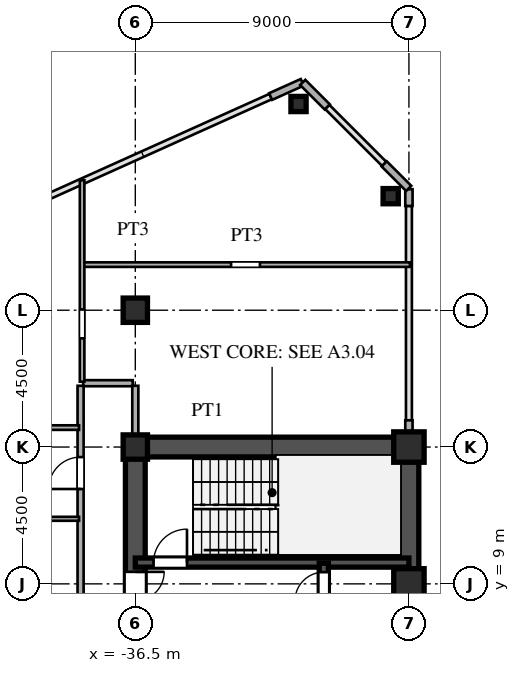
"""IFC4 building model, lengths in metres.
Left out: names, types, materials, properties, quantities, classifications, styles, units other than length and angle.
Written with IfcOpenShell. Run it as: python <this file> out.ifc"""

import sys

from ifc_helpers import new_model, si_unit, direction, frame, frame_2d, origin, origin_2d, place, context, subcontext, project, spatial, rectangle, hollow_rectangle, i_section, extrude, source, transform, mapped, element, fill, save


model = new_model("IFC4")
c1 = context("Model", 3, precision=1e-05, world=origin(), true_north=direction((0.0, 1.0)))
c2 = subcontext(c1, "Body", "Model", "MODEL_VIEW")
j1 = project(units=[si_unit("LENGTHUNIT", "METRE"), si_unit("PLANEANGLEUNIT", "RADIAN")], contexts=[c1])
p1 = place(None, origin())
s1 = spatial("IfcSite", under=j1, at=p1, CompositionType="ELEMENT")
p2 = place(p1, origin())
s2 = spatial("IfcBuilding", under=s1, at=p2, CompositionType="ELEMENT")
p3 = place(p2, frame((0.0, 0.0, 92.4)))
s3 = spatial("IfcBuildingStorey", under=s2, at=p3, CompositionType="ELEMENT", Elevation=92.4)
m1 = source(origin(), c2, "Body", "SweptSolid", [
    extrude(hollow_rectangle(XDim=1.0, YDim=1.0, WallThickness=0.042, at=origin_2d()), origin(), (0.0, 0.0, 1.0), 3.6),
])
for number, where, z_axis, x_axis in (
    (1, (-27.5, 9.0, 0.0), (0.0, 0.0, 1.0), (1.0, 0.0, 0.0)),
    (2, (-27.5, 13.5, 0.0), (0.0, 0.0, 1.0), (1.0, 0.0, 0.0)),
):
    element("IfcColumn", number, at=place(p3, frame(where, z_axis=z_axis, x_axis=x_axis)), inside=s3, PredefinedType="COLUMN", context=c2, shape_type="MappedRepresentation", body=[
        mapped(m1, transform((0.0, 0.0, 0.0), scale=1.0)),
    ])
m2 = source(origin(), c2, "Body", "SweptSolid", [
    extrude(i_section(OverallWidth=0.8, OverallDepth=0.8, WebThickness=0.032, FlangeThickness=0.05, at=origin_2d()), origin(), (0.0, 0.0, 1.0), 3.6),
])
for number, where, z_axis, x_axis in (
    (3, (-36.5, 13.5, 0.0), (0.0, 0.0, 1.0), (1.0, 0.0, 0.0)),
    (4, (-36.5, 18.0, 0.0), (0.0, 0.0, 1.0), (1.0, 0.0, 0.0)),
):
    element("IfcColumn", number, at=place(p3, frame(where, z_axis=z_axis, x_axis=x_axis)), inside=s3, PredefinedType="COLUMN", context=c2, shape_type="MappedRepresentation", body=[
        mapped(m2, transform((0.0, 0.0, 0.0), scale=1.0)),
    ])
m3 = source(origin(), c2, "Body", "SweptSolid", [
    extrude(hollow_rectangle(XDim=0.5, YDim=0.5, WallThickness=0.02, at=origin_2d()), origin(), (0.0, 0.0, 1.0), 3.6),
])
for number, where, z_axis, x_axis in (
    (5, (-28.1, 21.751, 0.0), (0.0, 0.0, 1.0), (1.0, 0.0, 0.0)),
    (6, (-31.131, 24.783, 0.0), (0.0, 0.0, 1.0), (1.0, 0.0, 0.0)),
):
    element("IfcColumn", number, at=place(p3, frame(where, z_axis=z_axis, x_axis=x_axis)), inside=s3, PredefinedType="COLUMN", context=c2, shape_type="MappedRepresentation", body=[
        mapped(m3, transform((0.0, 0.0, 0.0), scale=1.0)),
    ])
p4 = place(p3, frame((-27.5, 13.83, 0.0), z_axis=(0.0, 0.0, 1.0), x_axis=(0.0, 1.0, 0.0)))
e7 = element("IfcWall", 7, at=p4, inside=s3, PredefinedType="SOLIDWALL", context=c2, shape_type="SweptSolid", body=[
    extrude(rectangle(XDim=0.55, YDim=0.24, at=frame_2d((0.275, 0.0))), origin(), (0.0, 0.0, 1.0), 2.88),
])
p5 = place(p3, frame((-27.5, 21.43, 0.0), z_axis=(0.0, 0.0, 1.0), x_axis=(0.0, 1.0, 0.0)))
e8 = element("IfcWall", 8, at=p5, inside=s3, PredefinedType="SOLIDWALL", context=c2, shape_type="SweptSolid", body=[
    extrude(rectangle(XDim=0.55, YDim=0.24, at=frame_2d((0.275, 0.0))), origin(), (0.0, 0.0, 1.0), 3.38),
])
for number, where, z_axis, x_axis in (
    (9, (-27.507, 22.007, 0.0), (0.0, 0.0, 1.0), (-0.707, 0.707, 0.0)),
    (10, (-30.187, 24.687, 0.0), (0.0, 0.0, 1.0), (-0.707, 0.707, 0.0)),
):
    element("IfcWall", number, at=place(p3, frame(where, z_axis=z_axis, x_axis=x_axis)), inside=s3, PredefinedType="SOLIDWALL", context=c2, shape_type="SweptSolid", body=[
        extrude(rectangle(XDim=1.14, YDim=0.24, at=frame_2d((0.57, 0.0))), origin(), (0.0, 0.0, 1.0), 3.38),
    ])
p6 = place(p3, frame((-31.009, 25.496, 0.0), z_axis=(0.0, 0.0, 1.0), x_axis=(-0.911929519623, -0.410346866979, 0.0)))
e11 = element("IfcWall", 11, at=p6, inside=s3, PredefinedType="SOLIDWALL", context=c2, shape_type="SweptSolid", body=[
    extrude(rectangle(XDim=1.14, YDim=0.24, at=frame_2d((0.57, 0.0))), origin(), (0.0, 0.0, 1.0), 3.38),
])
p7 = place(p3, frame((-27.5, 1.3, 0.0), z_axis=(0.0, 0.0, 1.0), x_axis=(0.0, 1.0, 0.0)))
e12 = element("IfcWall", 12, at=p7, inside=s3, PredefinedType="SHEAR", context=c2, shape_type="SweptSolid", body=[
    extrude(rectangle(XDim=12.2, YDim=0.65, at=frame_2d((6.1, 0.0))), origin(), (0.0, 0.0, 1.0), 3.38),
])
p8 = place(p3, frame((-36.5, 13.5, 0.0), z_axis=(0.0, 0.0, 1.0), x_axis=(1.0, 0.0, 0.0)))
e13 = element("IfcWall", 13, at=p8, inside=s3, PredefinedType="SHEAR", context=c2, shape_type="SweptSolid", body=[
    extrude(rectangle(XDim=9.0, YDim=0.65, at=frame_2d((4.5, 0.0))), origin(), (0.0, 0.0, 1.0), 3.38),
])
p9 = place(p3, frame((-36.5, 8.2, 0.0), z_axis=(0.0, 0.0, 1.0), x_axis=(0.0, 1.0, 0.0)))
e14 = element("IfcWall", 14, at=p9, inside=s3, PredefinedType="SHEAR", context=c2, shape_type="SweptSolid", body=[
    extrude(rectangle(XDim=5.45, YDim=0.65, at=frame_2d((2.725, 0.0))), origin(), (0.0, 0.0, 1.0), 3.38),
])
p10 = place(p9, frame((0.245, 0.0, 0.0)))
e15 = element("IfcOpeningElement", 15, at=p10, cuts=e14, PredefinedType="OPENING", context=c2, shape_type="SweptSolid", body=[
    extrude(rectangle(XDim=0.95, YDim=2.15, at=frame_2d((0.475, 1.075))), frame((0.0, 0.335, 0.0), z_axis=(0.0, -1.0, 0.0), x_axis=(1.0, 0.0, 0.0)), (0.0, 0.0, 1.0), 0.67),
])
p11 = place(p3, frame((-36.5, 9.7, 0.0), z_axis=(0.0, 0.0, 1.0), x_axis=(1.0, 0.0, 0.0)))
e16 = element("IfcWall", 16, at=p11, inside=s3, PredefinedType="SHEAR", context=c2, shape_type="SweptSolid", body=[
    extrude(rectangle(XDim=9.0, YDim=0.3, at=frame_2d((4.5, 0.0))), origin(), (0.0, 0.0, 1.0), 3.38),
])
p12 = place(p11, frame((0.6, 0.0, 0.0)))
e17 = element("IfcOpeningElement", 17, at=p12, cuts=e16, PredefinedType="OPENING", context=c2, shape_type="SweptSolid", body=[
    extrude(rectangle(XDim=1.1, YDim=2.2, at=frame_2d((0.55, 1.1))), frame((0.0, 0.16, 0.0), z_axis=(0.0, -1.0, 0.0), x_axis=(1.0, 0.0, 0.0)), (0.0, 0.0, 1.0), 0.32),
])
p13 = place(p3, frame((-30.3, 8.15, 0.0), z_axis=(0.0, 0.0, 1.0), x_axis=(0.0, 1.0, 0.0)))
e18 = element("IfcWall", 18, at=p13, inside=s3, PredefinedType="SHEAR", context=c2, shape_type="SweptSolid", body=[
    extrude(rectangle(XDim=1.53, YDim=0.3, at=frame_2d((0.765, 0.0))), origin(), (0.0, 0.0, 1.0), 3.38),
])
p14 = place(p13, frame((0.285, 0.0, 0.0)))
e19 = element("IfcOpeningElement", 19, at=p14, cuts=e18, PredefinedType="OPENING", context=c2, shape_type="SweptSolid", body=[
    extrude(rectangle(XDim=0.95, YDim=2.15, at=frame_2d((0.475, 1.075))), frame((0.0, 0.16, 0.0), z_axis=(0.0, -1.0, 0.0), x_axis=(1.0, 0.0, 0.0)), (0.0, 0.0, 1.0), 0.32),
])
p15 = place(p3, frame((-44.1, 11.14, 0.0), z_axis=(0.0, 0.0, 1.0), x_axis=(1.0, 0.0, 0.0)))
e20 = element("IfcWall", 20, at=p15, inside=s3, PredefinedType="PARTITIONING", context=c2, shape_type="SweptSolid", body=[
    extrude(rectangle(XDim=5.75, YDim=0.13, at=frame_2d((2.875, 0.0))), origin(), (0.0, 0.0, 1.0), 3.38),
])
p16 = place(p15, frame((2.435, 0.0, 0.0)))
e21 = element("IfcOpeningElement", 21, at=p16, cuts=e20, PredefinedType="OPENING", context=c2, shape_type="SweptSolid", body=[
    extrude(rectangle(XDim=0.88, YDim=2.1, at=frame_2d((0.44, 1.05))), frame((0.0, 0.075, 0.0), z_axis=(0.0, -1.0, 0.0), x_axis=(1.0, 0.0, 0.0)), (0.0, 0.0, 1.0), 0.15),
])
p17 = place(p3, frame((-44.1, 14.14, 0.0), z_axis=(0.0, 0.0, 1.0), x_axis=(1.0, 0.0, 0.0)))
e22 = element("IfcWall", 22, at=p17, inside=s3, PredefinedType="PARTITIONING", context=c2, shape_type="SweptSolid", body=[
    extrude(rectangle(XDim=5.75, YDim=0.15, at=frame_2d((2.875, 0.0))), origin(), (0.0, 0.0, 1.0), 3.38),
])
p18 = place(p17, frame((2.4, 0.0, 0.0)))
e23 = element("IfcOpeningElement", 23, at=p18, cuts=e22, PredefinedType="OPENING", context=c2, shape_type="SweptSolid", body=[
    extrude(rectangle(XDim=0.95, YDim=2.15, at=frame_2d((0.475, 1.075))), frame((0.0, 0.085, 0.0), z_axis=(0.0, -1.0, 0.0), x_axis=(1.0, 0.0, 0.0)), (0.0, 0.0, 1.0), 0.17),
])
p19 = place(p3, frame((-38.215, 15.6, 0.0), z_axis=(0.0, 0.0, 1.0), x_axis=(1.0, 0.0, 0.0)))
e24 = element("IfcWall", 24, at=p19, inside=s3, PredefinedType="PARTITIONING", context=c2, shape_type="SweptSolid", body=[
    extrude(rectangle(XDim=1.63, YDim=0.2, at=frame_2d((0.815, 0.0))), origin(), (0.0, 0.0, 1.0), 3.38),
])
p20 = place(p3, frame((-38.2, 19.5, 0.0), z_axis=(0.0, 0.0, 1.0), x_axis=(1.0, 0.0, 0.0)))
e25 = element("IfcWall", 25, at=p20, inside=s3, PredefinedType="PARTITIONING", context=c2, shape_type="SweptSolid", body=[
    extrude(rectangle(XDim=10.735, YDim=0.15, at=frame_2d((5.367, 0.0))), origin(), (0.0, 0.0, 1.0), 3.38),
])
p21 = place(p20, frame((4.85, 0.0, 0.0)))
e26 = element("IfcOpeningElement", 26, at=p21, cuts=e25, PredefinedType="OPENING", context=c2, shape_type="SweptSolid", body=[
    extrude(rectangle(XDim=0.95, YDim=2.15, at=frame_2d((0.475, 1.075))), frame((0.0, 0.085, 0.0), z_axis=(0.0, -1.0, 0.0), x_axis=(1.0, 0.0, 0.0)), (0.0, 0.0, 1.0), 0.17),
])
p22 = place(p3, frame((-38.3, -15.515, 0.0), z_axis=(0.0, 0.0, 1.0), x_axis=(0.0, 1.0, 0.0)))
e27 = element("IfcWall", 27, at=p22, inside=s3, PredefinedType="PARTITIONING", context=c2, shape_type="SweptSolid", body=[
    extrude(rectangle(XDim=31.03, YDim=0.2, at=frame_2d((15.515, 0.0))), origin(), (0.0, 0.0, 1.0), 3.38),
])
p23 = place(p22, frame((0.79, 0.0, 0.0)))
e28 = element("IfcOpeningElement", 28, at=p23, cuts=e27, PredefinedType="OPENING", context=c2, shape_type="SweptSolid", body=[
    extrude(rectangle(XDim=1.05, YDim=2.25, at=frame_2d((0.525, 1.125))), frame((0.0, 0.11, 0.0), z_axis=(0.0, -1.0, 0.0), x_axis=(1.0, 0.0, 0.0)), (0.0, 0.0, 1.0), 0.22),
])
p24 = place(p22, frame((7.186, 0.0, 0.0)))
e29 = element("IfcOpeningElement", 29, at=p24, cuts=e27, PredefinedType="OPENING", context=c2, shape_type="SweptSolid", body=[
    extrude(rectangle(XDim=1.05, YDim=2.25, at=frame_2d((0.525, 1.125))), frame((0.0, 0.11, 0.0), z_axis=(0.0, -1.0, 0.0), x_axis=(1.0, 0.0, 0.0)), (0.0, 0.0, 1.0), 0.22),
])
p25 = place(p22, frame((17.825, 0.0, 0.0)))
e30 = element("IfcOpeningElement", 30, at=p25, cuts=e27, PredefinedType="OPENING", context=c2, shape_type="SweptSolid", body=[
    extrude(rectangle(XDim=1.05, YDim=2.25, at=frame_2d((0.525, 1.125))), frame((0.0, 0.11, 0.0), z_axis=(0.0, -1.0, 0.0), x_axis=(1.0, 0.0, 0.0)), (0.0, 0.0, 1.0), 0.22),
])
p26 = place(p22, frame((27.635, 0.0, 0.0)))
e31 = element("IfcOpeningElement", 31, at=p26, cuts=e27, PredefinedType="OPENING", context=c2, shape_type="SweptSolid", body=[
    extrude(rectangle(XDim=1.05, YDim=2.25, at=frame_2d((0.525, 1.125))), frame((0.0, 0.11, 0.0), z_axis=(0.0, -1.0, 0.0), x_axis=(1.0, 0.0, 0.0)), (0.0, 0.0, 1.0), 0.22),
])
p27 = place(p3, frame((-38.25, 15.65, 0.0), z_axis=(0.0, 0.0, 1.0), x_axis=(0.0, 1.0, 0.0)))
e32 = element("IfcWall", 32, at=p27, inside=s3, PredefinedType="PARTITIONING", context=c2, shape_type="SweptSolid", body=[
    extrude(rectangle(XDim=6.623, YDim=0.15, at=frame_2d((3.312, 0.0))), origin(), (0.0, 0.0, 1.0), 3.38),
])
p28 = place(p27, frame((1.425, 0.0, 0.0)))
e33 = element("IfcOpeningElement", 33, at=p28, cuts=e32, PredefinedType="OPENING", context=c2, shape_type="SweptSolid", body=[
    extrude(rectangle(XDim=0.95, YDim=2.15, at=frame_2d((0.475, 1.075))), frame((0.0, 0.085, 0.0), z_axis=(0.0, -1.0, 0.0), x_axis=(1.0, 0.0, 0.0)), (0.0, 0.0, 1.0), 0.17),
])
p29 = place(p3, frame((-36.5, 13.83, 0.0), z_axis=(0.0, 0.0, 1.0), x_axis=(0.0, 1.0, 0.0)))
e34 = element("IfcWall", 34, at=p29, inside=s3, PredefinedType="PARTITIONING", context=c2, shape_type="SweptSolid", body=[
    extrude(rectangle(XDim=1.685, YDim=0.2, at=frame_2d((0.842, 0.0))), origin(), (0.0, 0.0, 1.0), 2.68),
])
m4 = source(origin(), c2, "Body", "SweptSolid", [
    extrude(rectangle(XDim=0.95, YDim=2.15, at=frame_2d((0.475, 1.075))), frame((0.0, 0.025, 0.0), z_axis=(0.0, -1.0, 0.0), x_axis=(1.0, 0.0, 0.0)), (0.0, 0.0, 1.0), 0.05),
])
p30 = place(p10, frame((0.95, 0.0, 0.0), z_axis=(0.0, 0.0, 1.0), x_axis=(-1.0, 0.0, 0.0)))
e35 = element("IfcDoor", 35, at=p30, inside=s3, OperationType="SINGLE_SWING_RIGHT", PredefinedType="DOOR", context=c2, shape_type="MappedRepresentation", body=[
    mapped(m4, transform((0.0, 0.0, 0.0), scale=1.0)),
])
fill(e15, e35)
m5 = source(origin(), c2, "Body", "SweptSolid", [
    extrude(rectangle(XDim=1.1, YDim=2.2, at=frame_2d((0.55, 1.1))), frame((0.0, 0.025, 0.0), z_axis=(0.0, -1.0, 0.0), x_axis=(1.0, 0.0, 0.0)), (0.0, 0.0, 1.0), 0.05),
])
p31 = place(p12, origin())
e36 = element("IfcDoor", 36, at=p31, inside=s3, OperationType="SINGLE_SWING_RIGHT", PredefinedType="DOOR", context=c2, shape_type="MappedRepresentation", body=[
    mapped(m5, transform((0.0, 0.0, 0.0), scale=1.0)),
])
fill(e17, e36)
p32 = place(p14, origin())
e37 = element("IfcDoor", 37, at=p32, inside=s3, OperationType="SINGLE_SWING_LEFT", PredefinedType="DOOR", context=c2, shape_type="MappedRepresentation", body=[
    mapped(m4, transform((0.0, 0.0, 0.0), scale=1.0)),
])
fill(e19, e37)
m6 = source(origin(), c2, "Body", "SweptSolid", [
    extrude(rectangle(XDim=1.05, YDim=2.25, at=frame_2d((0.525, 1.125))), frame((0.0, 0.025, 0.0), z_axis=(0.0, -1.0, 0.0), x_axis=(1.0, 0.0, 0.0)), (0.0, 0.0, 1.0), 0.05),
])
p33 = place(p26, origin())
e38 = element("IfcDoor", 38, at=p33, inside=s3, OperationType="SINGLE_SWING_LEFT", PredefinedType="DOOR", context=c2, shape_type="MappedRepresentation", body=[
    mapped(m6, transform((0.0, 0.0, 0.0), scale=1.0)),
])
fill(e31, e38)
save(model, sys.argv[1])
